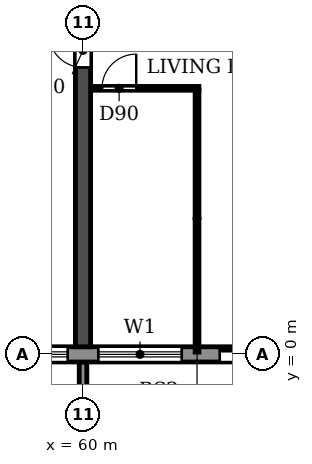
"""IFC4 building model, lengths in metres.
Left out: names, types, materials, properties, quantities, classifications, styles, units other than length and angle.
Written with IfcOpenShell. Run it as: python <this file> out.ifc"""

import sys

from ifc_helpers import new_model, si_unit, direction, frame, frame_2d, origin, place, context, subcontext, project, spatial, polyline, rectangle, outline, extrude, source, transform, mapped, element, fill, save


model = new_model("IFC4")
c1 = context("Model", 3, precision=1e-05, world=origin(), true_north=direction((0.0, 1.0)))
c2 = subcontext(c1, "Body", "Model", "MODEL_VIEW")
j1 = project(units=[si_unit("LENGTHUNIT", "METRE"), si_unit("PLANEANGLEUNIT", "RADIAN")], contexts=[c1])
p1 = place(None, origin())
s1 = spatial("IfcSite", under=j1, at=p1, CompositionType="ELEMENT")
p2 = place(p1, origin())
s2 = spatial("IfcBuilding", under=s1, at=p2, CompositionType="ELEMENT")
p3 = place(p2, frame((0.0, 0.0, 33.3)))
s3 = spatial("IfcBuildingStorey", under=s2, at=p3, CompositionType="ELEMENT", Elevation=33.3)
p4 = place(p3, frame((60.0, 0.2, 0.0), z_axis=(0.0, 0.0, 1.0), x_axis=(0.0, 1.0, 0.0)))
e1 = element("IfcWall", 1, at=p4, inside=s3, PredefinedType="SHEAR", context=c2, shape_type="SweptSolid", body=[
    extrude(rectangle(XDim=11.65, YDim=0.4, at=frame_2d((5.825, 0.0))), origin(), (0.0, 0.0, 1.0), 3.05),
])
p5 = place(p4, frame((7.35, 0.0, 0.0)))
e2 = element("IfcOpeningElement", 2, at=p5, cuts=e1, PredefinedType="OPENING", context=c2, shape_type="SweptSolid", body=[
    extrude(rectangle(XDim=0.9, YDim=2.1, at=frame_2d((0.45, 1.05))), frame((0.0, 0.21, 0.0), z_axis=(0.0, -1.0, 0.0), x_axis=(1.0, 0.0, 0.0)), (0.0, 0.0, 1.0), 0.42),
])
p6 = place(p3, frame((4.683, 0.0, 0.0), z_axis=(0.0, 0.0, 1.0), x_axis=(1.0, 0.0, 0.0)))
e3 = element("IfcWall", 3, at=p6, inside=s3, PredefinedType="STANDARD", context=c2, shape_type="SweptSolid", body=[
    extrude(rectangle(XDim=92.634, YDim=0.4, at=frame_2d((46.317, 0.0))), origin(), (0.0, 0.0, 1.0), 3.05),
])
p7 = place(p6, frame((1.717, 0.0, 0.9)))
e4 = element("IfcOpeningElement", 4, at=p7, cuts=e3, PredefinedType="OPENING", context=c2, shape_type="SweptSolid", body=[
    extrude(rectangle(XDim=2.2, YDim=1.5, at=frame_2d((1.1, 0.75))), frame((0.0, 0.21, 0.0), z_axis=(0.0, -1.0, 0.0), x_axis=(1.0, 0.0, 0.0)), (0.0, 0.0, 1.0), 0.42),
])
p8 = place(p6, frame((4.717, 0.0, 0.9)))
e5 = element("IfcOpeningElement", 5, at=p8, cuts=e3, PredefinedType="OPENING", context=c2, shape_type="SweptSolid", body=[
    extrude(rectangle(XDim=2.2, YDim=1.5, at=frame_2d((1.1, 0.75))), frame((0.0, 0.21, 0.0), z_axis=(0.0, -1.0, 0.0), x_axis=(1.0, 0.0, 0.0)), (0.0, 0.0, 1.0), 0.42),
])
p9 = place(p6, frame((7.917, 0.0, 0.0)))
e6 = element("IfcOpeningElement", 6, at=p9, cuts=e3, PredefinedType="OPENING", context=c2, shape_type="SweptSolid", body=[
    extrude(rectangle(XDim=1.8, YDim=2.4, at=frame_2d((0.9, 1.2))), frame((0.0, 0.21, 0.0), z_axis=(0.0, -1.0, 0.0), x_axis=(1.0, 0.0, 0.0)), (0.0, 0.0, 1.0), 0.42),
])
p10 = place(p6, frame((10.717, 0.0, 0.9)))
e7 = element("IfcOpeningElement", 7, at=p10, cuts=e3, PredefinedType="OPENING", context=c2, shape_type="SweptSolid", body=[
    extrude(rectangle(XDim=2.2, YDim=1.5, at=frame_2d((1.1, 0.75))), frame((0.0, 0.21, 0.0), z_axis=(0.0, -1.0, 0.0), x_axis=(1.0, 0.0, 0.0)), (0.0, 0.0, 1.0), 0.42),
])
p11 = place(p6, frame((13.717, 0.0, 0.9)))
e8 = element("IfcOpeningElement", 8, at=p11, cuts=e3, PredefinedType="OPENING", context=c2, shape_type="SweptSolid", body=[
    extrude(rectangle(XDim=2.2, YDim=1.5, at=frame_2d((1.1, 0.75))), frame((0.0, 0.21, 0.0), z_axis=(0.0, -1.0, 0.0), x_axis=(1.0, 0.0, 0.0)), (0.0, 0.0, 1.0), 0.42),
])
p12 = place(p6, frame((16.717, 0.0, 0.9)))
e9 = element("IfcOpeningElement", 9, at=p12, cuts=e3, PredefinedType="OPENING", context=c2, shape_type="SweptSolid", body=[
    extrude(rectangle(XDim=2.2, YDim=1.5, at=frame_2d((1.1, 0.75))), frame((0.0, 0.21, 0.0), z_axis=(0.0, -1.0, 0.0), x_axis=(1.0, 0.0, 0.0)), (0.0, 0.0, 1.0), 0.42),
])
p13 = place(p6, frame((19.717, 0.0, 0.9)))
e10 = element("IfcOpeningElement", 10, at=p13, cuts=e3, PredefinedType="OPENING", context=c2, shape_type="SweptSolid", body=[
    extrude(rectangle(XDim=2.2, YDim=1.5, at=frame_2d((1.1, 0.75))), frame((0.0, 0.21, 0.0), z_axis=(0.0, -1.0, 0.0), x_axis=(1.0, 0.0, 0.0)), (0.0, 0.0, 1.0), 0.42),
])
p14 = place(p6, frame((22.917, 0.0, 0.0)))
e11 = element("IfcOpeningElement", 11, at=p14, cuts=e3, PredefinedType="OPENING", context=c2, shape_type="SweptSolid", body=[
    extrude(rectangle(XDim=1.8, YDim=2.4, at=frame_2d((0.9, 1.2))), frame((0.0, 0.21, 0.0), z_axis=(0.0, -1.0, 0.0), x_axis=(1.0, 0.0, 0.0)), (0.0, 0.0, 1.0), 0.42),
])
p15 = place(p6, frame((25.717, 0.0, 0.9)))
e12 = element("IfcOpeningElement", 12, at=p15, cuts=e3, PredefinedType="OPENING", context=c2, shape_type="SweptSolid", body=[
    extrude(rectangle(XDim=2.2, YDim=1.5, at=frame_2d((1.1, 0.75))), frame((0.0, 0.21, 0.0), z_axis=(0.0, -1.0, 0.0), x_axis=(1.0, 0.0, 0.0)), (0.0, 0.0, 1.0), 0.42),
])
p16 = place(p6, frame((28.717, 0.0, 0.9)))
e13 = element("IfcOpeningElement", 13, at=p16, cuts=e3, PredefinedType="OPENING", context=c2, shape_type="SweptSolid", body=[
    extrude(rectangle(XDim=2.2, YDim=1.5, at=frame_2d((1.1, 0.75))), frame((0.0, 0.21, 0.0), z_axis=(0.0, -1.0, 0.0), x_axis=(1.0, 0.0, 0.0)), (0.0, 0.0, 1.0), 0.42),
])
p17 = place(p6, frame((31.717, 0.0, 0.9)))
e14 = element("IfcOpeningElement", 14, at=p17, cuts=e3, PredefinedType="OPENING", context=c2, shape_type="SweptSolid", body=[
    extrude(rectangle(XDim=2.2, YDim=1.5, at=frame_2d((1.1, 0.75))), frame((0.0, 0.21, 0.0), z_axis=(0.0, -1.0, 0.0), x_axis=(1.0, 0.0, 0.0)), (0.0, 0.0, 1.0), 0.42),
])
p18 = place(p6, frame((34.717, 0.0, 0.9)))
e15 = element("IfcOpeningElement", 15, at=p18, cuts=e3, PredefinedType="OPENING", context=c2, shape_type="SweptSolid", body=[
    extrude(rectangle(XDim=2.2, YDim=1.5, at=frame_2d((1.1, 0.75))), frame((0.0, 0.21, 0.0), z_axis=(0.0, -1.0, 0.0), x_axis=(1.0, 0.0, 0.0)), (0.0, 0.0, 1.0), 0.42),
])
p19 = place(p6, frame((37.717, 0.0, 0.9)))
e16 = element("IfcOpeningElement", 16, at=p19, cuts=e3, PredefinedType="OPENING", context=c2, shape_type="SweptSolid", body=[
    extrude(rectangle(XDim=2.2, YDim=1.5, at=frame_2d((1.1, 0.75))), frame((0.0, 0.21, 0.0), z_axis=(0.0, -1.0, 0.0), x_axis=(1.0, 0.0, 0.0)), (0.0, 0.0, 1.0), 0.42),
])
p20 = place(p6, frame((40.717, 0.0, 0.9)))
e17 = element("IfcOpeningElement", 17, at=p20, cuts=e3, PredefinedType="OPENING", context=c2, shape_type="SweptSolid", body=[
    extrude(rectangle(XDim=2.2, YDim=1.5, at=frame_2d((1.1, 0.75))), frame((0.0, 0.21, 0.0), z_axis=(0.0, -1.0, 0.0), x_axis=(1.0, 0.0, 0.0)), (0.0, 0.0, 1.0), 0.42),
])
p21 = place(p6, frame((43.717, 0.0, 0.9)))
e18 = element("IfcOpeningElement", 18, at=p21, cuts=e3, PredefinedType="OPENING", context=c2, shape_type="SweptSolid", body=[
    extrude(rectangle(XDim=2.2, YDim=1.5, at=frame_2d((1.1, 0.75))), frame((0.0, 0.21, 0.0), z_axis=(0.0, -1.0, 0.0), x_axis=(1.0, 0.0, 0.0)), (0.0, 0.0, 1.0), 0.42),
])
p22 = place(p6, frame((46.917, 0.0, 0.0)))
e19 = element("IfcOpeningElement", 19, at=p22, cuts=e3, PredefinedType="OPENING", context=c2, shape_type="SweptSolid", body=[
    extrude(rectangle(XDim=1.8, YDim=2.4, at=frame_2d((0.9, 1.2))), frame((0.0, 0.21, 0.0), z_axis=(0.0, -1.0, 0.0), x_axis=(1.0, 0.0, 0.0)), (0.0, 0.0, 1.0), 0.42),
])
p23 = place(p6, frame((49.717, 0.0, 0.9)))
e20 = element("IfcOpeningElement", 20, at=p23, cuts=e3, PredefinedType="OPENING", context=c2, shape_type="SweptSolid", body=[
    extrude(rectangle(XDim=2.2, YDim=1.5, at=frame_2d((1.1, 0.75))), frame((0.0, 0.21, 0.0), z_axis=(0.0, -1.0, 0.0), x_axis=(1.0, 0.0, 0.0)), (0.0, 0.0, 1.0), 0.42),
])
p24 = place(p6, frame((52.717, 0.0, 0.9)))
e21 = element("IfcOpeningElement", 21, at=p24, cuts=e3, PredefinedType="OPENING", context=c2, shape_type="SweptSolid", body=[
    extrude(rectangle(XDim=2.2, YDim=1.5, at=frame_2d((1.1, 0.75))), frame((0.0, 0.21, 0.0), z_axis=(0.0, -1.0, 0.0), x_axis=(1.0, 0.0, 0.0)), (0.0, 0.0, 1.0), 0.42),
])
p25 = place(p6, frame((55.717, 0.0, 0.9)))
e22 = element("IfcOpeningElement", 22, at=p25, cuts=e3, PredefinedType="OPENING", context=c2, shape_type="SweptSolid", body=[
    extrude(rectangle(XDim=2.2, YDim=1.5, at=frame_2d((1.1, 0.75))), frame((0.0, 0.21, 0.0), z_axis=(0.0, -1.0, 0.0), x_axis=(1.0, 0.0, 0.0)), (0.0, 0.0, 1.0), 0.42),
])
p26 = place(p6, frame((58.917, 0.0, 0.0)))
e23 = element("IfcOpeningElement", 23, at=p26, cuts=e3, PredefinedType="OPENING", context=c2, shape_type="SweptSolid", body=[
    extrude(rectangle(XDim=1.8, YDim=2.4, at=frame_2d((0.9, 1.2))), frame((0.0, 0.21, 0.0), z_axis=(0.0, -1.0, 0.0), x_axis=(1.0, 0.0, 0.0)), (0.0, 0.0, 1.0), 0.42),
])
p27 = place(p6, frame((61.717, 0.0, 0.9)))
e24 = element("IfcOpeningElement", 24, at=p27, cuts=e3, PredefinedType="OPENING", context=c2, shape_type="SweptSolid", body=[
    extrude(rectangle(XDim=2.2, YDim=1.5, at=frame_2d((1.1, 0.75))), frame((0.0, 0.21, 0.0), z_axis=(0.0, -1.0, 0.0), x_axis=(1.0, 0.0, 0.0)), (0.0, 0.0, 1.0), 0.42),
])
p28 = place(p6, frame((64.717, 0.0, 0.9)))
e25 = element("IfcOpeningElement", 25, at=p28, cuts=e3, PredefinedType="OPENING", context=c2, shape_type="SweptSolid", body=[
    extrude(rectangle(XDim=2.2, YDim=1.5, at=frame_2d((1.1, 0.75))), frame((0.0, 0.21, 0.0), z_axis=(0.0, -1.0, 0.0), x_axis=(1.0, 0.0, 0.0)), (0.0, 0.0, 1.0), 0.42),
])
p29 = place(p6, frame((67.717, 0.0, 0.9)))
e26 = element("IfcOpeningElement", 26, at=p29, cuts=e3, PredefinedType="OPENING", context=c2, shape_type="SweptSolid", body=[
    extrude(rectangle(XDim=2.2, YDim=1.5, at=frame_2d((1.1, 0.75))), frame((0.0, 0.21, 0.0), z_axis=(0.0, -1.0, 0.0), x_axis=(1.0, 0.0, 0.0)), (0.0, 0.0, 1.0), 0.42),
])
p30 = place(p6, frame((70.917, 0.0, 0.0)))
e27 = element("IfcOpeningElement", 27, at=p30, cuts=e3, PredefinedType="OPENING", context=c2, shape_type="SweptSolid", body=[
    extrude(rectangle(XDim=1.8, YDim=2.4, at=frame_2d((0.9, 1.2))), frame((0.0, 0.21, 0.0), z_axis=(0.0, -1.0, 0.0), x_axis=(1.0, 0.0, 0.0)), (0.0, 0.0, 1.0), 0.42),
])
p31 = place(p6, frame((73.717, 0.0, 0.9)))
e28 = element("IfcOpeningElement", 28, at=p31, cuts=e3, PredefinedType="OPENING", context=c2, shape_type="SweptSolid", body=[
    extrude(rectangle(XDim=2.2, YDim=1.5, at=frame_2d((1.1, 0.75))), frame((0.0, 0.21, 0.0), z_axis=(0.0, -1.0, 0.0), x_axis=(1.0, 0.0, 0.0)), (0.0, 0.0, 1.0), 0.42),
])
p32 = place(p6, frame((76.717, 0.0, 0.9)))
e29 = element("IfcOpeningElement", 29, at=p32, cuts=e3, PredefinedType="OPENING", context=c2, shape_type="SweptSolid", body=[
    extrude(rectangle(XDim=2.2, YDim=1.5, at=frame_2d((1.1, 0.75))), frame((0.0, 0.21, 0.0), z_axis=(0.0, -1.0, 0.0), x_axis=(1.0, 0.0, 0.0)), (0.0, 0.0, 1.0), 0.42),
])
p33 = place(p6, frame((79.717, 0.0, 0.9)))
e30 = element("IfcOpeningElement", 30, at=p33, cuts=e3, PredefinedType="OPENING", context=c2, shape_type="SweptSolid", body=[
    extrude(rectangle(XDim=2.2, YDim=1.5, at=frame_2d((1.1, 0.75))), frame((0.0, 0.21, 0.0), z_axis=(0.0, -1.0, 0.0), x_axis=(1.0, 0.0, 0.0)), (0.0, 0.0, 1.0), 0.42),
])
p34 = place(p6, frame((82.717, 0.0, 0.9)))
e31 = element("IfcOpeningElement", 31, at=p34, cuts=e3, PredefinedType="OPENING", context=c2, shape_type="SweptSolid", body=[
    extrude(rectangle(XDim=2.2, YDim=1.5, at=frame_2d((1.1, 0.75))), frame((0.0, 0.21, 0.0), z_axis=(0.0, -1.0, 0.0), x_axis=(1.0, 0.0, 0.0)), (0.0, 0.0, 1.0), 0.42),
])
p35 = place(p6, frame((85.717, 0.0, 0.9)))
e32 = element("IfcOpeningElement", 32, at=p35, cuts=e3, PredefinedType="OPENING", context=c2, shape_type="SweptSolid", body=[
    extrude(rectangle(XDim=2.2, YDim=1.5, at=frame_2d((1.1, 0.75))), frame((0.0, 0.21, 0.0), z_axis=(0.0, -1.0, 0.0), x_axis=(1.0, 0.0, 0.0)), (0.0, 0.0, 1.0), 0.42),
])
p36 = place(p6, frame((88.717, 0.0, 0.9)))
e33 = element("IfcOpeningElement", 33, at=p36, cuts=e3, PredefinedType="OPENING", context=c2, shape_type="SweptSolid", body=[
    extrude(rectangle(XDim=2.2, YDim=1.5, at=frame_2d((1.1, 0.75))), frame((0.0, 0.21, 0.0), z_axis=(0.0, -1.0, 0.0), x_axis=(1.0, 0.0, 0.0)), (0.0, 0.0, 1.0), 0.42),
])
m1 = source(origin(), c2, "Body", "SweptSolid", [
    extrude(outline(polyline([(0.0, 0.0), (0.2, 0.0), (0.2, 1.65), (0.0, 1.65), (0.0, 0.0)])), origin(), (0.0, 0.0, 1.0), 3.1),
])
p37 = place(p3, frame((59.9, -1.85, 0.0)))
e34 = element("IfcWall", 34, at=p37, inside=s3, PredefinedType="STANDARD", context=c2, shape_type="MappedRepresentation", body=[
    mapped(m1, transform((0.0, 0.0, 0.0))),
])
p38 = place(p3, frame((60.21, 7.0, 0.0), z_axis=(0.0, 0.0, 1.0), x_axis=(1.0, 0.0, 0.0)))
e35 = element("IfcWall", 35, at=p38, inside=s3, PredefinedType="PARTITIONING", context=c2, shape_type="SweptSolid", body=[
    extrude(rectangle(XDim=2.84, YDim=0.1, at=frame_2d((1.42, 0.0))), origin(), (0.0, 0.0, 1.0), 3.05),
])
p39 = place(p38, frame((0.29, 0.0, 0.0)))
e36 = element("IfcOpeningElement", 36, at=p39, cuts=e35, PredefinedType="OPENING", context=c2, shape_type="SweptSolid", body=[
    extrude(rectangle(XDim=0.9, YDim=2.1, at=frame_2d((0.45, 1.05))), frame((0.0, 0.06, 0.0), z_axis=(0.0, -1.0, 0.0), x_axis=(1.0, 0.0, 0.0)), (0.0, 0.0, 1.0), 0.12),
])
p40 = place(p3, frame((63.0, 0.06, 0.0), z_axis=(0.0, 0.0, 1.0), x_axis=(0.0, 1.0, 0.0)))
e37 = element("IfcWall", 37, at=p40, inside=s3, PredefinedType="PARTITIONING", context=c2, shape_type="SweptSolid", body=[
    extrude(rectangle(XDim=6.89, YDim=0.1, at=frame_2d((3.445, 0.0))), origin(), (0.0, 0.0, 1.0), 3.05),
])
p41 = place(p24, origin())
e38 = element("IfcWindow", 38, at=p41, inside=s3, PartitioningType="DOUBLE_PANEL_HORIZONTAL", PredefinedType="WINDOW", context=c2, shape_type="SweptSolid", body=[
    extrude(rectangle(XDim=2.2, YDim=1.5, at=frame_2d((1.1, 0.75))), frame((0.0, 0.03, 0.0), z_axis=(0.0, -1.0, 0.0), x_axis=(1.0, 0.0, 0.0)), (0.0, 0.0, 1.0), 0.06),
])
fill(e21, e38)
p42 = place(p25, origin())
e39 = element("IfcWindow", 39, at=p42, inside=s3, PartitioningType="DOUBLE_PANEL_HORIZONTAL", PredefinedType="WINDOW", context=c2, shape_type="SweptSolid", body=[
    extrude(rectangle(XDim=2.2, YDim=1.5, at=frame_2d((1.1, 0.75))), frame((0.0, 0.03, 0.0), z_axis=(0.0, -1.0, 0.0), x_axis=(1.0, 0.0, 0.0)), (0.0, 0.0, 1.0), 0.06),
])
fill(e22, e39)
p43 = place(p26, origin())
e40 = element("IfcDoor", 40, at=p43, inside=s3, OperationType="DOUBLE_DOOR_SLIDING", PredefinedType="DOOR", context=c2, shape_type="SweptSolid", body=[
    extrude(rectangle(XDim=1.8, YDim=2.4, at=frame_2d((0.9, 1.2))), frame((0.0, 0.025, 0.0), z_axis=(0.0, -1.0, 0.0), x_axis=(1.0, 0.0, 0.0)), (0.0, 0.0, 1.0), 0.05),
])
fill(e23, e40)
p44 = place(p5, origin())
e41 = element("IfcDoor", 41, at=p44, inside=s3, OperationType="SINGLE_SWING_RIGHT", PredefinedType="DOOR", context=c2, shape_type="SweptSolid", body=[
    extrude(rectangle(XDim=0.9, YDim=2.1, at=frame_2d((0.45, 1.05))), frame((0.0, 0.025, 0.0), z_axis=(0.0, -1.0, 0.0), x_axis=(1.0, 0.0, 0.0)), (0.0, 0.0, 1.0), 0.05),
])
fill(e2, e41)
p45 = place(p39, origin())
e42 = element("IfcDoor", 42, at=p45, inside=s3, OperationType="SINGLE_SWING_RIGHT", PredefinedType="DOOR", context=c2, shape_type="SweptSolid", body=[
    extrude(rectangle(XDim=0.9, YDim=2.1, at=frame_2d((0.45, 1.05))), frame((0.0, 0.025, 0.0), z_axis=(0.0, -1.0, 0.0), x_axis=(1.0, 0.0, 0.0)), (0.0, 0.0, 1.0), 0.05),
])
fill(e36, e42)
save(model, sys.argv[1])
